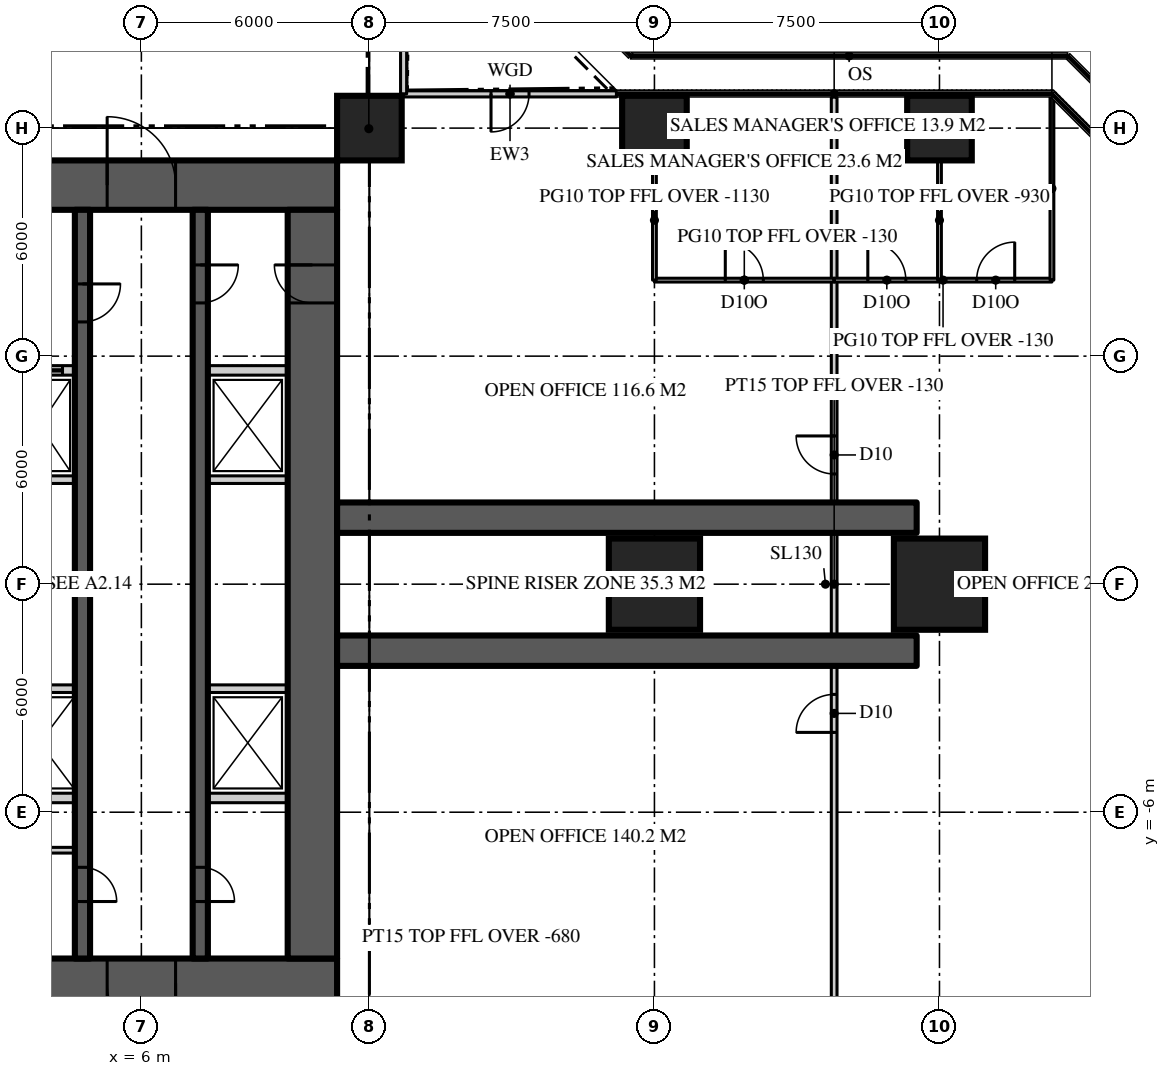
"""IFC4 building model, lengths in metres.
Left out: names, types, materials, properties, quantities, classifications, styles, units other than length and angle.
Written with IfcOpenShell. Run it as: python <this file> out.ifc"""

import sys

from ifc_helpers import new_model, si_unit, direction, frame, frame_2d, origin, origin_2d, place, context, subcontext, project, spatial, rectangle, extrude, element, fill, save


model = new_model("IFC4")
c1 = context("Model", 3, precision=1e-05, world=origin(), true_north=direction((0.0, 1.0)))
c2 = subcontext(c1, "Body", "Model", "MODEL_VIEW")
j1 = project(units=[si_unit("LENGTHUNIT", "METRE"), si_unit("PLANEANGLEUNIT", "RADIAN")], contexts=[c1])
p1 = place(None, origin())
s1 = spatial("IfcSite", under=j1, at=p1, CompositionType="ELEMENT")
p2 = place(p1, origin())
s2 = spatial("IfcBuilding", under=s1, at=p2, CompositionType="ELEMENT")
p3 = place(p2, frame((0.0, 0.0, 90.3)))
s3 = spatial("IfcBuildingStorey", under=s2, at=p3, CompositionType="ELEMENT", Elevation=90.3)
p4 = place(p3, frame((-11.15, 10.5, 0.0), z_axis=(0.0, 0.0, 1.0), x_axis=(1.0, 0.0, 0.0)))
e1 = element("IfcWall", 1, at=p4, inside=s3, PredefinedType="SHEAR", context=c2, shape_type="SweptSolid", body=[
    extrude(rectangle(XDim=22.3, YDim=1.3, at=frame_2d((11.15, 0.0))), origin(), (0.0, 0.0, 1.0), 3.9),
])
p5 = place(p4, frame((4.25, 0.0, 0.0)))
e2 = element("IfcOpeningElement", 2, at=p5, cuts=e1, PredefinedType="OPENING", context=c2, shape_type="SweptSolid", body=[
    extrude(rectangle(XDim=1.8, YDim=2.2, at=frame_2d((0.9, 1.1))), frame((0.0, 0.66, 0.0), z_axis=(0.0, -1.0, 0.0), x_axis=(1.0, 0.0, 0.0)), (0.0, 0.0, 1.0), 1.32),
])
p6 = place(p4, frame((16.25, 0.0, 0.0)))
e3 = element("IfcOpeningElement", 3, at=p6, cuts=e1, PredefinedType="OPENING", context=c2, shape_type="SweptSolid", body=[
    extrude(rectangle(XDim=1.8, YDim=2.2, at=frame_2d((0.9, 1.1))), frame((0.0, 0.66, 0.0), z_axis=(0.0, -1.0, 0.0), x_axis=(1.0, 0.0, 0.0)), (0.0, 0.0, 1.0), 1.32),
])
p7 = place(p3, frame((11.15, -10.5, 0.0), z_axis=(0.0, 0.0, 1.0), x_axis=(-1.0, 0.0, 0.0)))
e4 = element("IfcWall", 4, at=p7, inside=s3, PredefinedType="SHEAR", context=c2, shape_type="SweptSolid", body=[
    extrude(rectangle(XDim=22.3, YDim=1.3, at=frame_2d((11.15, 0.0))), origin(), (0.0, 0.0, 1.0), 3.9),
])
p8 = place(p7, frame((16.25, 0.0, 0.0)))
e5 = element("IfcOpeningElement", 5, at=p8, cuts=e4, PredefinedType="OPENING", context=c2, shape_type="SweptSolid", body=[
    extrude(rectangle(XDim=1.8, YDim=2.2, at=frame_2d((0.9, 1.1))), frame((0.0, 0.66, 0.0), z_axis=(0.0, -1.0, 0.0), x_axis=(1.0, 0.0, 0.0)), (0.0, 0.0, 1.0), 1.32),
])
p9 = place(p7, frame((4.25, 0.0, 0.0)))
e6 = element("IfcOpeningElement", 6, at=p9, cuts=e4, PredefinedType="OPENING", context=c2, shape_type="SweptSolid", body=[
    extrude(rectangle(XDim=1.8, YDim=2.2, at=frame_2d((0.9, 1.1))), frame((0.0, 0.66, 0.0), z_axis=(0.0, -1.0, 0.0), x_axis=(1.0, 0.0, 0.0)), (0.0, 0.0, 1.0), 1.32),
])
p10 = place(p3, frame((10.5, -9.85, 0.0), z_axis=(0.0, 0.0, 1.0), x_axis=(0.0, 1.0, 0.0)))
e7 = element("IfcWall", 7, at=p10, inside=s3, PredefinedType="SHEAR", context=c2, shape_type="SweptSolid", body=[
    extrude(rectangle(XDim=19.7, YDim=1.3, at=frame_2d((9.85, 0.0))), origin(), (0.0, 0.0, 1.0), 3.9),
])
p11 = place(p10, frame((17.25, 0.0, 0.0)))
e8 = element("IfcOpeningElement", 8, at=p11, cuts=e7, PredefinedType="OPENING", context=c2, shape_type="SweptSolid", body=[
    extrude(rectangle(XDim=1.0, YDim=2.2, at=frame_2d((0.5, 1.1))), frame((0.0, 0.66, 0.0), z_axis=(0.0, -1.0, 0.0), x_axis=(1.0, 0.0, 0.0)), (0.0, 0.0, 1.0), 1.32),
])
for number, where, z_axis, x_axis in (
    (9, (11.15, -1.75, 0.0), (0.0, 0.0, 1.0), (1.0, 0.0, 0.0)),
    (10, (11.15, 1.75, 0.0), (0.0, 0.0, 1.0), (1.0, 0.0, 0.0)),
):
    element("IfcWall", number, at=place(p3, frame(where, z_axis=z_axis, x_axis=x_axis)), inside=s3, PredefinedType="SHEAR", context=c2, shape_type="SweptSolid", body=[
        extrude(rectangle(XDim=15.25, YDim=0.8, at=frame_2d((7.625, 0.0))), origin(), (0.0, 0.0, 1.0), 3.9),
    ])
for number, where, z_axis, x_axis in (
    (11, (19.5, 0.0, 0.0), (0.0, 0.0, 1.0), (1.0, 0.0, 0.0)),
    (12, (27.0, 0.0, 0.0), (0.0, 0.0, 1.0), (1.0, 0.0, 0.0)),
):
    element("IfcColumn", number, at=place(p3, frame(where, z_axis=z_axis, x_axis=x_axis)), inside=s3, PredefinedType="COLUMN", context=c2, shape_type="SweptSolid", body=[
        extrude(rectangle(XDim=2.4, YDim=2.4, at=origin_2d()), origin(), (0.0, 0.0, 1.0), 3.9),
    ])
for number, where, z_axis, x_axis in (
    (13, (12.0, 12.0, 0.0), (0.0, 0.0, 1.0), (1.0, 0.0, 0.0)),
    (14, (19.5, 12.0, 0.0), (0.0, 0.0, 1.0), (1.0, 0.0, 0.0)),
    (15, (27.0, 12.0, 0.0), (0.0, 0.0, 1.0), (1.0, 0.0, 0.0)),
):
    element("IfcColumn", number, at=place(p3, frame(where, z_axis=z_axis, x_axis=x_axis)), inside=s3, PredefinedType="COLUMN", context=c2, shape_type="SweptSolid", body=[
        extrude(rectangle(XDim=1.7, YDim=1.7, at=origin_2d()), origin(), (0.0, 0.0, 1.0), 3.9),
    ])
p12 = place(p3, frame((18.5, 12.9, 0.0), z_axis=(0.0, 0.0, 1.0), x_axis=(-1.0, 0.0, 0.0)))
e16 = element("IfcWall", 16, at=p12, inside=s3, PredefinedType="SOLIDWALL", context=c2, shape_type="SweptSolid", body=[
    extrude(rectangle(XDim=5.6, YDim=0.16, at=frame_2d((2.8, 0.0))), origin(), (0.0, 0.0, 1.0), 3.77),
])
p13 = place(p12, frame((2.3, 0.0, 0.0)))
e17 = element("IfcOpeningElement", 17, at=p13, cuts=e16, PredefinedType="OPENING", context=c2, shape_type="SweptSolid", body=[
    extrude(rectangle(XDim=1.0, YDim=2.2, at=frame_2d((0.5, 1.1))), frame((0.0, 0.09, 0.0), z_axis=(0.0, -1.0, 0.0), x_axis=(1.0, 0.0, 0.0)), (0.0, 0.0, 1.0), 0.18),
])
p14 = place(p3, frame((12.9, 12.9, 0.0), z_axis=(0.0, 0.0, 1.0), x_axis=(0.0, 1.0, 0.0)))
e18 = element("IfcWall", 18, at=p14, inside=s3, PredefinedType="SOLIDWALL", context=c2, shape_type="SweptSolid", body=[
    extrude(rectangle(XDim=5.6, YDim=0.16, at=frame_2d((2.8, 0.0))), origin(), (0.0, 0.0, 1.0), 3.77),
])
p15 = place(p3, frame((7.55, 9.85, 0.0), z_axis=(0.0, 0.0, 1.0), x_axis=(0.0, -1.0, 0.0)))
e19 = element("IfcWall", 19, at=p15, inside=s3, PredefinedType="SHEAR", context=c2, shape_type="SweptSolid", body=[
    extrude(rectangle(XDim=19.7, YDim=0.4, at=frame_2d((9.85, 0.0))), origin(), (0.0, 0.0, 1.0), 3.9),
])
p16 = place(p15, frame((1.45, 0.0, 0.0)))
e20 = element("IfcOpeningElement", 20, at=p16, cuts=e19, PredefinedType="OPENING", context=c2, shape_type="SweptSolid", body=[
    extrude(rectangle(XDim=1.0, YDim=2.2, at=frame_2d((0.5, 1.1))), frame((0.0, 0.21, 0.0), z_axis=(0.0, -1.0, 0.0), x_axis=(1.0, 0.0, 0.0)), (0.0, 0.0, 1.0), 0.42),
])
p17 = place(p15, frame((17.3, 0.0, 0.0)))
e21 = element("IfcOpeningElement", 21, at=p17, cuts=e19, PredefinedType="OPENING", context=c2, shape_type="SweptSolid", body=[
    extrude(rectangle(XDim=0.9, YDim=2.1, at=frame_2d((0.45, 1.05))), frame((0.0, 0.21, 0.0), z_axis=(0.0, -1.0, 0.0), x_axis=(1.0, 0.0, 0.0)), (0.0, 0.0, 1.0), 0.42),
])
p18 = place(p3, frame((4.45, 9.85, 0.0), z_axis=(0.0, 0.0, 1.0), x_axis=(0.0, -1.0, 0.0)))
e22 = element("IfcWall", 22, at=p18, inside=s3, PredefinedType="SHEAR", context=c2, shape_type="SweptSolid", body=[
    extrude(rectangle(XDim=19.7, YDim=0.4, at=frame_2d((9.85, 0.0))), origin(), (0.0, 0.0, 1.0), 3.9),
])
p19 = place(p18, frame((1.95, 0.0, 0.0)))
e23 = element("IfcOpeningElement", 23, at=p19, cuts=e22, PredefinedType="OPENING", context=c2, shape_type="SweptSolid", body=[
    extrude(rectangle(XDim=1.0, YDim=2.2, at=frame_2d((0.5, 1.1))), frame((0.0, 0.21, 0.0), z_axis=(0.0, -1.0, 0.0), x_axis=(1.0, 0.0, 0.0)), (0.0, 0.0, 1.0), 0.42),
])
p20 = place(p18, frame((17.3, 0.0, 0.0)))
e24 = element("IfcOpeningElement", 24, at=p20, cuts=e22, PredefinedType="OPENING", context=c2, shape_type="SweptSolid", body=[
    extrude(rectangle(XDim=0.9, YDim=2.1, at=frame_2d((0.45, 1.05))), frame((0.0, 0.21, 0.0), z_axis=(0.0, -1.0, 0.0), x_axis=(1.0, 0.0, 0.0)), (0.0, 0.0, 1.0), 0.42),
])
p21 = place(p3, frame((2.4, 5.625, 0.0), z_axis=(0.0, 0.0, 1.0), x_axis=(1.0, 0.0, 0.0)))
e25 = element("IfcWall", 25, at=p21, inside=s3, PredefinedType="SOLIDWALL", context=c2, shape_type="SweptSolid", body=[
    extrude(rectangle(XDim=1.85, YDim=0.25, at=frame_2d((0.925, 0.0))), origin(), (0.0, 0.0, 1.0), 3.7),
])
p22 = place(p21, frame((0.325, 0.0, 0.0)))
e26 = element("IfcOpeningElement", 26, at=p22, cuts=e25, PredefinedType="OPENING", context=c2, shape_type="SweptSolid", body=[
    extrude(rectangle(XDim=1.2, YDim=2.2, at=frame_2d((0.6, 1.1))), frame((0.0, 0.135, 0.0), z_axis=(0.0, -1.0, 0.0), x_axis=(1.0, 0.0, 0.0)), (0.0, 0.0, 1.0), 0.27),
])
p23 = place(p3, frame((7.75, 5.625, 0.0), z_axis=(0.0, 0.0, 1.0), x_axis=(1.0, 0.0, 0.0)))
e27 = element("IfcWall", 27, at=p23, inside=s3, PredefinedType="SOLIDWALL", context=c2, shape_type="SweptSolid", body=[
    extrude(rectangle(XDim=2.1, YDim=0.25, at=frame_2d((1.05, 0.0))), origin(), (0.0, 0.0, 1.0), 3.7),
])
p24 = place(p3, frame((2.4, -5.625, 0.0), z_axis=(0.0, 0.0, 1.0), x_axis=(1.0, 0.0, 0.0)))
e28 = element("IfcWall", 28, at=p24, inside=s3, PredefinedType="SOLIDWALL", context=c2, shape_type="SweptSolid", body=[
    extrude(rectangle(XDim=1.85, YDim=0.25, at=frame_2d((0.925, 0.0))), origin(), (0.0, 0.0, 1.0), 3.7),
])
p25 = place(p3, frame((7.75, -5.625, 0.0), z_axis=(0.0, 0.0, 1.0), x_axis=(1.0, 0.0, 0.0)))
e29 = element("IfcWall", 29, at=p25, inside=s3, PredefinedType="SOLIDWALL", context=c2, shape_type="SweptSolid", body=[
    extrude(rectangle(XDim=2.1, YDim=0.25, at=frame_2d((1.05, 0.0))), origin(), (0.0, 0.0, 1.0), 3.7),
])
p26 = place(p3, frame((2.4, -2.75, 0.0), z_axis=(0.0, 0.0, 1.0), x_axis=(1.0, 0.0, 0.0)))
e30 = element("IfcWall", 30, at=p26, inside=s3, PredefinedType="SOLIDWALL", context=c2, shape_type="SweptSolid", body=[
    extrude(rectangle(XDim=1.85, YDim=0.2, at=frame_2d((0.925, 0.0))), origin(), (0.0, 0.0, 1.0), 3.7),
])
p27 = place(p3, frame((7.75, -2.75, 0.0), z_axis=(0.0, 0.0, 1.0), x_axis=(1.0, 0.0, 0.0)))
e31 = element("IfcWall", 31, at=p27, inside=s3, PredefinedType="SOLIDWALL", context=c2, shape_type="SweptSolid", body=[
    extrude(rectangle(XDim=2.1, YDim=0.2, at=frame_2d((1.05, 0.0))), origin(), (0.0, 0.0, 1.0), 3.7),
])
p28 = place(p3, frame((2.4, 2.75, 0.0), z_axis=(0.0, 0.0, 1.0), x_axis=(1.0, 0.0, 0.0)))
e32 = element("IfcWall", 32, at=p28, inside=s3, PredefinedType="SOLIDWALL", context=c2, shape_type="SweptSolid", body=[
    extrude(rectangle(XDim=1.85, YDim=0.2, at=frame_2d((0.925, 0.0))), origin(), (0.0, 0.0, 1.0), 3.7),
])
p29 = place(p3, frame((7.75, 2.75, 0.0), z_axis=(0.0, 0.0, 1.0), x_axis=(1.0, 0.0, 0.0)))
e33 = element("IfcWall", 33, at=p29, inside=s3, PredefinedType="SOLIDWALL", context=c2, shape_type="SweptSolid", body=[
    extrude(rectangle(XDim=2.1, YDim=0.2, at=frame_2d((1.05, 0.0))), origin(), (0.0, 0.0, 1.0), 3.7),
])
p30 = place(p3, frame((24.229, -12.82, 0.0), z_axis=(0.0, 0.0, 1.0), x_axis=(0.0, 1.0, 0.0)))
e34 = element("IfcWall", 34, at=p30, inside=s3, PredefinedType="PARTITIONING", context=c2, shape_type="SweptSolid", body=[
    extrude(rectangle(XDim=25.64, YDim=0.15, at=frame_2d((12.82, 0.0))), origin(), (0.0, 0.0, 1.0), 3.77),
])
p31 = place(p30, frame((15.72, 0.0, 0.0)))
e35 = element("IfcOpeningElement", 35, at=p31, cuts=e34, PredefinedType="OPENING", context=c2, shape_type="SweptSolid", body=[
    extrude(rectangle(XDim=1.0, YDim=2.2, at=frame_2d((0.5, 1.1))), frame((0.0, 0.085, 0.0), z_axis=(0.0, -1.0, 0.0), x_axis=(1.0, 0.0, 0.0)), (0.0, 0.0, 1.0), 0.17),
])
p32 = place(p30, frame((8.92, 0.0, 0.0)))
e36 = element("IfcOpeningElement", 36, at=p32, cuts=e34, PredefinedType="OPENING", context=c2, shape_type="SweptSolid", body=[
    extrude(rectangle(XDim=1.0, YDim=2.2, at=frame_2d((0.5, 1.1))), frame((0.0, 0.085, 0.0), z_axis=(0.0, -1.0, 0.0), x_axis=(1.0, 0.0, 0.0)), (0.0, 0.0, 1.0), 0.17),
])
p33 = place(p3, frame((19.5, 8.0, 0.0), z_axis=(0.0, 0.0, 1.0), x_axis=(1.0, 0.0, 0.0)))
e37 = element("IfcWall", 37, at=p33, inside=s3, PredefinedType="PARTITIONING", context=c2, shape_type="SweptSolid", body=[
    extrude(rectangle(XDim=4.729, YDim=0.1, at=frame_2d((2.365, 0.0))), origin(), (0.0, 0.0, 1.0), 3.77),
])
p34 = place(p33, frame((1.865, 0.0, 0.0)))
e38 = element("IfcOpeningElement", 38, at=p34, cuts=e37, PredefinedType="OPENING", context=c2, shape_type="SweptSolid", body=[
    extrude(rectangle(XDim=1.0, YDim=2.2, at=frame_2d((0.5, 1.1))), frame((0.0, 0.06, 0.0), z_axis=(0.0, -1.0, 0.0), x_axis=(1.0, 0.0, 0.0)), (0.0, 0.0, 1.0), 0.12),
])
p35 = place(p3, frame((24.229, 8.0, 0.0), z_axis=(0.0, 0.0, 1.0), x_axis=(1.0, 0.0, 0.0)))
e39 = element("IfcWall", 39, at=p35, inside=s3, PredefinedType="PARTITIONING", context=c2, shape_type="SweptSolid", body=[
    extrude(rectangle(XDim=5.73, YDim=0.1, at=frame_2d((2.865, 0.0))), origin(), (0.0, 0.0, 1.0), 3.77),
])
p36 = place(p35, frame((0.885, 0.0, 0.0)))
e40 = element("IfcOpeningElement", 40, at=p36, cuts=e39, PredefinedType="OPENING", context=c2, shape_type="SweptSolid", body=[
    extrude(rectangle(XDim=1.0, YDim=2.2, at=frame_2d((0.5, 1.1))), frame((0.0, 0.06, 0.0), z_axis=(0.0, -1.0, 0.0), x_axis=(1.0, 0.0, 0.0)), (0.0, 0.0, 1.0), 0.12),
])
p37 = place(p35, frame((3.75, 0.0, 0.0)))
e41 = element("IfcOpeningElement", 41, at=p37, cuts=e39, PredefinedType="OPENING", context=c2, shape_type="SweptSolid", body=[
    extrude(rectangle(XDim=1.0, YDim=2.2, at=frame_2d((0.5, 1.1))), frame((0.0, 0.06, 0.0), z_axis=(0.0, -1.0, 0.0), x_axis=(1.0, 0.0, 0.0)), (0.0, 0.0, 1.0), 0.12),
])
p38 = place(p3, frame((19.5, 8.0, 0.0), z_axis=(0.0, 0.0, 1.0), x_axis=(0.0, 1.0, 0.0)))
e42 = element("IfcWall", 42, at=p38, inside=s3, PredefinedType="PARTITIONING", context=c2, shape_type="SweptSolid", body=[
    extrude(rectangle(XDim=3.15, YDim=0.1, at=frame_2d((1.575, 0.0))), origin(), (0.0, 0.0, 1.0), 2.77),
])
p39 = place(p3, frame((27.0, 8.0, 0.0), z_axis=(0.0, 0.0, 1.0), x_axis=(0.0, 1.0, 0.0)))
e43 = element("IfcWall", 43, at=p39, inside=s3, PredefinedType="PARTITIONING", context=c2, shape_type="SweptSolid", body=[
    extrude(rectangle(XDim=3.15, YDim=0.1, at=frame_2d((1.575, 0.0))), origin(), (0.0, 0.0, 1.0), 2.97),
])
p40 = place(p3, frame((29.959, 8.0, 0.0), z_axis=(0.0, 0.0, 1.0), x_axis=(0.0, 1.0, 0.0)))
e44 = element("IfcWall", 44, at=p40, inside=s3, PredefinedType="PARTITIONING", context=c2, shape_type="SweptSolid", body=[
    extrude(rectangle(XDim=4.82, YDim=0.1, at=frame_2d((2.41, 0.0))), origin(), (0.0, 0.0, 1.0), 3.77),
])
p41 = place(p3, frame((11.15, 11.15, 0.0), z_axis=(0.0, 0.0, 1.0), x_axis=(0.707106781187, 0.707106781187, 0.0)))
e45 = element("IfcWall", 45, at=p41, inside=s3, PredefinedType="PARTITIONING", context=c2, shape_type="SweptSolid", body=[
    extrude(rectangle(XDim=2.362, YDim=0.15, at=frame_2d((1.181, 0.0))), origin(), (0.0, 0.0, 1.0), 3.22),
])
p42 = place(p3, frame((2.4, -7.0, 0.0), z_axis=(0.0, 0.0, 1.0), x_axis=(1.0, 0.0, 0.0)))
e46 = element("IfcWall", 46, at=p42, inside=s3, PredefinedType="SOLIDWALL", context=c2, shape_type="SweptSolid", body=[
    extrude(rectangle(XDim=1.85, YDim=0.15, at=frame_2d((0.925, 0.0))), origin(), (0.0, 0.0, 1.0), 3.77),
])
p43 = place(p42, frame((0.1, 0.0, 0.0)))
e47 = element("IfcOpeningElement", 47, at=p43, cuts=e46, PredefinedType="OPENING", context=c2, shape_type="SweptSolid", body=[
    extrude(rectangle(XDim=0.9, YDim=2.1, at=frame_2d((0.45, 1.05))), frame((0.0, 0.085, 0.0), z_axis=(0.0, -1.0, 0.0), x_axis=(1.0, 0.0, 0.0)), (0.0, 0.0, 1.0), 0.17),
])
p44 = place(p13, origin())
e48 = element("IfcDoor", 48, at=p44, inside=s3, OperationType="SINGLE_SWING_RIGHT", PredefinedType="DOOR", context=c2, shape_type="SweptSolid", body=[
    extrude(rectangle(XDim=1.0, YDim=2.2, at=frame_2d((0.5, 1.1))), frame((0.0, 0.025, 0.0), z_axis=(0.0, -1.0, 0.0), x_axis=(1.0, 0.0, 0.0)), (0.0, 0.0, 1.0), 0.05),
])
fill(e17, e48)
p45 = place(p6, origin())
e49 = element("IfcDoor", 49, at=p45, inside=s3, OperationType="DOUBLE_DOOR_DOUBLE_SWING", PredefinedType="DOOR", context=c2, shape_type="SweptSolid", body=[
    extrude(rectangle(XDim=1.8, YDim=2.2, at=frame_2d((0.9, 1.1))), frame((0.0, 0.025, 0.0), z_axis=(0.0, -1.0, 0.0), x_axis=(1.0, 0.0, 0.0)), (0.0, 0.0, 1.0), 0.05),
])
fill(e3, e49)
p46 = place(p9, origin())
e50 = element("IfcDoor", 50, at=p46, inside=s3, OperationType="DOUBLE_DOOR_DOUBLE_SWING", PredefinedType="DOOR", context=c2, shape_type="SweptSolid", body=[
    extrude(rectangle(XDim=1.8, YDim=2.2, at=frame_2d((0.9, 1.1))), frame((0.0, 0.025, 0.0), z_axis=(0.0, -1.0, 0.0), x_axis=(1.0, 0.0, 0.0)), (0.0, 0.0, 1.0), 0.05),
])
fill(e6, e50)
p47 = place(p16, origin())
e51 = element("IfcDoor", 51, at=p47, inside=s3, OperationType="SINGLE_SWING_LEFT", PredefinedType="DOOR", context=c2, shape_type="SweptSolid", body=[
    extrude(rectangle(XDim=1.0, YDim=2.2, at=frame_2d((0.5, 1.1))), frame((0.0, 0.025, 0.0), z_axis=(0.0, -1.0, 0.0), x_axis=(1.0, 0.0, 0.0)), (0.0, 0.0, 1.0), 0.05),
])
fill(e20, e51)
p48 = place(p11, origin())
e52 = element("IfcDoor", 52, at=p48, inside=s3, OperationType="SINGLE_SWING_RIGHT", PredefinedType="DOOR", context=c2, shape_type="SweptSolid", body=[
    extrude(rectangle(XDim=1.0, YDim=2.2, at=frame_2d((0.5, 1.1))), frame((0.0, 0.025, 0.0), z_axis=(0.0, -1.0, 0.0), x_axis=(1.0, 0.0, 0.0)), (0.0, 0.0, 1.0), 0.05),
])
fill(e8, e52)
p49 = place(p19, origin())
e53 = element("IfcDoor", 53, at=p49, inside=s3, OperationType="SINGLE_SWING_LEFT", PredefinedType="DOOR", context=c2, shape_type="SweptSolid", body=[
    extrude(rectangle(XDim=1.0, YDim=2.2, at=frame_2d((0.5, 1.1))), frame((0.0, 0.025, 0.0), z_axis=(0.0, -1.0, 0.0), x_axis=(1.0, 0.0, 0.0)), (0.0, 0.0, 1.0), 0.05),
])
fill(e23, e53)
p50 = place(p17, origin())
e54 = element("IfcDoor", 54, at=p50, inside=s3, OperationType="SINGLE_SWING_RIGHT", PredefinedType="DOOR", context=c2, shape_type="SweptSolid", body=[
    extrude(rectangle(XDim=0.9, YDim=2.1, at=frame_2d((0.45, 1.05))), frame((0.0, 0.025, 0.0), z_axis=(0.0, -1.0, 0.0), x_axis=(1.0, 0.0, 0.0)), (0.0, 0.0, 1.0), 0.05),
])
fill(e21, e54)
p51 = place(p20, origin())
e55 = element("IfcDoor", 55, at=p51, inside=s3, OperationType="SINGLE_SWING_RIGHT", PredefinedType="DOOR", context=c2, shape_type="SweptSolid", body=[
    extrude(rectangle(XDim=0.9, YDim=2.1, at=frame_2d((0.45, 1.05))), frame((0.0, 0.025, 0.0), z_axis=(0.0, -1.0, 0.0), x_axis=(1.0, 0.0, 0.0)), (0.0, 0.0, 1.0), 0.05),
])
fill(e24, e55)
p52 = place(p22, origin())
e56 = element("IfcDoor", 56, at=p52, inside=s3, OperationType="SLIDING_TO_LEFT", PredefinedType="DOOR", context=c2, shape_type="SweptSolid", body=[
    extrude(rectangle(XDim=1.2, YDim=2.2, at=frame_2d((0.6, 1.1))), frame((0.0, 0.025, 0.0), z_axis=(0.0, -1.0, 0.0), x_axis=(1.0, 0.0, 0.0)), (0.0, 0.0, 1.0), 0.05),
])
fill(e26, e56)
p53 = place(p31, origin())
e57 = element("IfcDoor", 57, at=p53, inside=s3, OperationType="SINGLE_SWING_RIGHT", PredefinedType="DOOR", context=c2, shape_type="SweptSolid", body=[
    extrude(rectangle(XDim=1.0, YDim=2.2, at=frame_2d((0.5, 1.1))), frame((0.0, 0.025, 0.0), z_axis=(0.0, -1.0, 0.0), x_axis=(1.0, 0.0, 0.0)), (0.0, 0.0, 1.0), 0.05),
])
fill(e35, e57)
p54 = place(p32, origin())
e58 = element("IfcDoor", 58, at=p54, inside=s3, OperationType="SINGLE_SWING_LEFT", PredefinedType="DOOR", context=c2, shape_type="SweptSolid", body=[
    extrude(rectangle(XDim=1.0, YDim=2.2, at=frame_2d((0.5, 1.1))), frame((0.0, 0.025, 0.0), z_axis=(0.0, -1.0, 0.0), x_axis=(1.0, 0.0, 0.0)), (0.0, 0.0, 1.0), 0.05),
])
fill(e36, e58)
p55 = place(p34, origin())
e59 = element("IfcDoor", 59, at=p55, inside=s3, OperationType="SINGLE_SWING_LEFT", PredefinedType="DOOR", context=c2, shape_type="SweptSolid", body=[
    extrude(rectangle(XDim=1.0, YDim=2.2, at=frame_2d((0.5, 1.1))), frame((0.0, 0.025, 0.0), z_axis=(0.0, -1.0, 0.0), x_axis=(1.0, 0.0, 0.0)), (0.0, 0.0, 1.0), 0.05),
])
fill(e38, e59)
p56 = place(p36, origin())
e60 = element("IfcDoor", 60, at=p56, inside=s3, OperationType="SINGLE_SWING_LEFT", PredefinedType="DOOR", context=c2, shape_type="SweptSolid", body=[
    extrude(rectangle(XDim=1.0, YDim=2.2, at=frame_2d((0.5, 1.1))), frame((0.0, 0.025, 0.0), z_axis=(0.0, -1.0, 0.0), x_axis=(1.0, 0.0, 0.0)), (0.0, 0.0, 1.0), 0.05),
])
fill(e40, e60)
p57 = place(p37, origin())
e61 = element("IfcDoor", 61, at=p57, inside=s3, OperationType="SINGLE_SWING_RIGHT", PredefinedType="DOOR", context=c2, shape_type="SweptSolid", body=[
    extrude(rectangle(XDim=1.0, YDim=2.2, at=frame_2d((0.5, 1.1))), frame((0.0, 0.025, 0.0), z_axis=(0.0, -1.0, 0.0), x_axis=(1.0, 0.0, 0.0)), (0.0, 0.0, 1.0), 0.05),
])
fill(e41, e61)
save(model, sys.argv[1])
